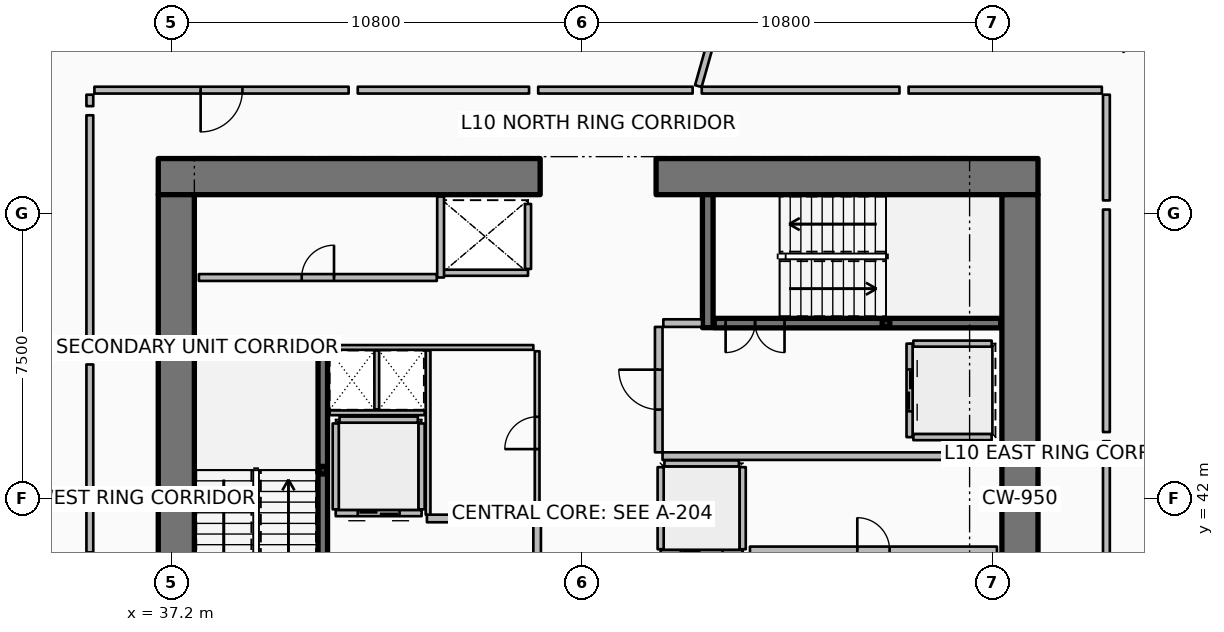
"""IFC4 building model, lengths in metres.
Left out: names, types, materials, properties, quantities, classifications, styles, units other than length and angle.
Written with IfcOpenShell. Run it as: python <this file> out.ifc"""

import sys

from ifc_helpers import new_model, si_unit, direction, frame, frame_2d, origin, origin_2d, place, context, subcontext, project, spatial, rectangle, hollow_rectangle, extrude, element, fill, save


model = new_model("IFC4")
c1 = context("Model", 3, precision=1e-05, world=origin(), true_north=direction((0.0, 1.0)))
c2 = subcontext(c1, "Body", "Model", "MODEL_VIEW")
j1 = project(units=[si_unit("LENGTHUNIT", "METRE"), si_unit("PLANEANGLEUNIT", "RADIAN")], contexts=[c1])
p1 = place(None, origin())
s1 = spatial("IfcSite", under=j1, at=p1, CompositionType="ELEMENT")
p2 = place(p1, origin())
s2 = spatial("IfcBuilding", under=s1, at=p2, CompositionType="ELEMENT")
p3 = place(p2, frame((0.0, 0.0, 45.15)))
s3 = spatial("IfcBuildingStorey", under=s2, at=p3, CompositionType="ELEMENT", Elevation=45.15)
p4 = place(p3, frame((36.85, 50.475, 0.0), z_axis=(0.0, 0.0, 1.0), x_axis=(1.0, 0.0, 0.0)))
e1 = element("IfcWall", 1, at=p4, inside=s3, PredefinedType="SHEAR", context=c2, shape_type="SweptSolid", body=[
    extrude(rectangle(XDim=10.05, YDim=0.95, at=frame_2d((5.025, 0.0))), origin(), (0.0, 0.0, 1.0), 3.75),
])
p5 = place(p3, frame((49.95, 50.475, 0.0), z_axis=(0.0, 0.0, 1.0), x_axis=(1.0, 0.0, 0.0)))
e2 = element("IfcWall", 2, at=p5, inside=s3, PredefinedType="SHEAR", context=c2, shape_type="SweptSolid", body=[
    extrude(rectangle(XDim=10.05, YDim=0.95, at=frame_2d((5.025, 0.0))), origin(), (0.0, 0.0, 1.0), 3.75),
])
for number, where, z_axis, x_axis in (
    (3, (37.325, 34.0, 0.0), (0.0, 0.0, 1.0), (0.0, 1.0, 0.0)),
    (4, (59.525, 34.0, 0.0), (0.0, 0.0, 1.0), (0.0, 1.0, 0.0)),
):
    element("IfcWall", number, at=place(p3, frame(where, z_axis=z_axis, x_axis=x_axis)), inside=s3, PredefinedType="SHEAR", context=c2, shape_type="SweptSolid", body=[
        extrude(rectangle(XDim=16.0, YDim=0.95, at=frame_2d((8.0, 0.0))), origin(), (0.0, 0.0, 1.0), 3.75),
    ])
for number, where, z_axis, x_axis in (
    (5, (37.8, 45.94, 0.0), (0.0, 0.0, 1.0), (1.0, 0.0, 0.0)),
    (6, (51.31, 46.5, 0.0), (0.0, 0.0, 1.0), (0.0, 1.0, 0.0)),
):
    element("IfcWall", number, at=place(p3, frame(where, z_axis=z_axis, x_axis=x_axis)), inside=s3, PredefinedType="SHEAR", context=c2, shape_type="SweptSolid", body=[
        extrude(rectangle(XDim=3.5, YDim=0.28, at=frame_2d((1.75, 0.0))), origin(), (0.0, 0.0, 1.0), 3.75),
    ])
for number, where, z_axis, x_axis in (
    (7, (41.18, 42.75, 0.0), (0.0, 0.0, 1.0), (1.0, 0.0, 0.0)),
    (8, (56.0, 46.62, 0.0), (0.0, 0.0, 1.0), (1.0, 0.0, 0.0)),
):
    element("IfcColumn", number, at=place(p3, frame(where, z_axis=z_axis, x_axis=x_axis)), inside=s3, PredefinedType="COLUMN", context=c2, shape_type="SweptSolid", body=[
        extrude(hollow_rectangle(XDim=0.2, YDim=0.2, WallThickness=0.01, InnerFilletRadius=0.01, OuterFilletRadius=0.02, at=origin_2d()), origin(), (0.0, 0.0, 1.0), 1.67),
    ])
p6 = place(p3, frame((41.18, 38.22, 0.0), z_axis=(0.0, 0.0, 1.0), x_axis=(0.0, 1.0, 0.0)))
e9 = element("IfcWall", 9, at=p6, inside=s3, PredefinedType="SOLIDWALL", context=c2, shape_type="SweptSolid", body=[
    extrude(rectangle(XDim=7.56, YDim=0.25, at=frame_2d((3.78, 0.0))), origin(), (0.0, 0.0, 1.0), 3.5),
])
p7 = place(p6, frame((0.3, 0.0, 0.0)))
e10 = element("IfcOpeningElement", 10, at=p7, cuts=e9, PredefinedType="OPENING", context=c2, shape_type="SweptSolid", body=[
    extrude(rectangle(XDim=1.55, YDim=2.15, at=frame_2d((0.775, 1.075))), frame((0.0, 0.135, 0.0), z_axis=(0.0, -1.0, 0.0), x_axis=(1.0, 0.0, 0.0)), (0.0, 0.0, 1.0), 0.27),
])
p8 = place(p3, frame((51.48, 46.62, 0.0), z_axis=(0.0, 0.0, 1.0), x_axis=(1.0, 0.0, 0.0)))
e11 = element("IfcWall", 11, at=p8, inside=s3, PredefinedType="SOLIDWALL", context=c2, shape_type="SweptSolid", body=[
    extrude(rectangle(XDim=7.54, YDim=0.25, at=frame_2d((3.77, 0.0))), origin(), (0.0, 0.0, 1.0), 3.5),
])
p9 = place(p8, frame((0.3, 0.0, 0.0)))
e12 = element("IfcOpeningElement", 12, at=p9, cuts=e11, PredefinedType="OPENING", context=c2, shape_type="SweptSolid", body=[
    extrude(rectangle(XDim=1.55, YDim=2.15, at=frame_2d((0.775, 1.075))), frame((0.0, 0.135, 0.0), z_axis=(0.0, -1.0, 0.0), x_axis=(1.0, 0.0, 0.0)), (0.0, 0.0, 1.0), 0.27),
])
p10 = place(p3, frame((46.58, 47.945, 0.0), z_axis=(0.0, 0.0, 1.0), x_axis=(-1.0, 0.0, 0.0)))
e13 = element("IfcWall", 13, at=p10, inside=s3, PredefinedType="PARTITIONING", context=c2, shape_type="SweptSolid", body=[
    extrude(rectangle(XDim=2.26, YDim=0.16, at=frame_2d((1.13, 0.0))), origin(), (0.0, 0.0, 1.0), 3.5),
])
p11 = place(p3, frame((46.58, 48.045, 0.0), z_axis=(0.0, 0.0, 1.0), x_axis=(0.0, 1.0, 0.0)))
e14 = element("IfcWall", 14, at=p11, inside=s3, PredefinedType="PARTITIONING", context=c2, shape_type="SweptSolid", body=[
    extrude(rectangle(XDim=1.71, YDim=0.16, at=frame_2d((0.855, 0.0))), origin(), (0.0, 0.0, 1.0), 3.5),
])
p12 = place(p3, frame((43.78, 41.62, 0.0), z_axis=(0.0, 0.0, 1.0), x_axis=(-1.0, 0.0, 0.0)))
e15 = element("IfcWall", 15, at=p12, inside=s3, PredefinedType="PARTITIONING", context=c2, shape_type="SweptSolid", body=[
    extrude(rectangle(XDim=2.26, YDim=0.16, at=frame_2d((1.13, 0.0))), origin(), (0.0, 0.0, 1.0), 3.5),
])
p13 = place(p12, frame((0.58, 0.0, 0.0)))
e16 = element("IfcOpeningElement", 16, at=p13, cuts=e15, PredefinedType="OPENING", context=c2, shape_type="SweptSolid", body=[
    extrude(rectangle(XDim=1.1, YDim=2.1, at=frame_2d((0.55, 1.05))), frame((0.0, 0.09, 0.0), z_axis=(0.0, -1.0, 0.0), x_axis=(1.0, 0.0, 0.0)), (0.0, 0.0, 1.0), 0.18),
])
for number, where, z_axis, x_axis in (
    (17, (43.78, 41.72, 0.0), (0.0, 0.0, 1.0), (0.0, 1.0, 0.0)),
    (18, (41.52, 41.72, 0.0), (0.0, 0.0, 1.0), (0.0, 1.0, 0.0)),
):
    element("IfcWall", number, at=place(p3, frame(where, z_axis=z_axis, x_axis=x_axis)), inside=s3, PredefinedType="PARTITIONING", context=c2, shape_type="SweptSolid", body=[
        extrude(rectangle(XDim=2.26, YDim=0.16, at=frame_2d((1.13, 0.0))), origin(), (0.0, 0.0, 1.0), 3.5),
    ])
p14 = place(p3, frame((41.62, 44.08, 0.0), z_axis=(0.0, 0.0, 1.0), x_axis=(1.0, 0.0, 0.0)))
e19 = element("IfcWall", 19, at=p14, inside=s3, PredefinedType="PARTITIONING", context=c2, shape_type="SweptSolid", body=[
    extrude(rectangle(XDim=2.06, YDim=0.16, at=frame_2d((1.03, 0.0))), origin(), (0.0, 0.0, 1.0), 3.5),
])
p15 = place(p3, frame((56.62, 46.08, 0.0), z_axis=(0.0, 0.0, 1.0), x_axis=(0.0, -1.0, 0.0)))
e20 = element("IfcWall", 20, at=p15, inside=s3, PredefinedType="PARTITIONING", context=c2, shape_type="SweptSolid", body=[
    extrude(rectangle(XDim=2.46, YDim=0.16, at=frame_2d((1.23, 0.0))), origin(), (0.0, 0.0, 1.0), 3.5),
])
p16 = place(p15, frame((0.68, 0.0, 0.0)))
e21 = element("IfcOpeningElement", 21, at=p16, cuts=e20, PredefinedType="OPENING", context=c2, shape_type="SweptSolid", body=[
    extrude(rectangle(XDim=1.1, YDim=2.1, at=frame_2d((0.55, 1.05))), frame((0.0, 0.09, 0.0), z_axis=(0.0, -1.0, 0.0), x_axis=(1.0, 0.0, 0.0)), (0.0, 0.0, 1.0), 0.18),
])
for number, where, z_axis, x_axis in (
    (22, (56.72, 46.08, 0.0), (0.0, 0.0, 1.0), (1.0, 0.0, 0.0)),
    (23, (56.72, 43.62, 0.0), (0.0, 0.0, 1.0), (1.0, 0.0, 0.0)),
):
    element("IfcWall", number, at=place(p3, frame(where, z_axis=z_axis, x_axis=x_axis)), inside=s3, PredefinedType="PARTITIONING", context=c2, shape_type="SweptSolid", body=[
        extrude(rectangle(XDim=2.06, YDim=0.16, at=frame_2d((1.03, 0.0))), origin(), (0.0, 0.0, 1.0), 3.5),
    ])
p17 = place(p3, frame((52.23, 40.57, 0.0), z_axis=(0.0, 0.0, 1.0), x_axis=(-1.0, 0.0, 0.0)))
e24 = element("IfcWall", 24, at=p17, inside=s3, PredefinedType="PARTITIONING", context=c2, shape_type="SweptSolid", body=[
    extrude(rectangle(XDim=2.16, YDim=0.16, at=frame_2d((1.08, 0.0))), origin(), (0.0, 0.0, 1.0), 3.5),
])
p18 = place(p17, frame((0.53, 0.0, 0.0)))
e25 = element("IfcOpeningElement", 25, at=p18, cuts=e24, PredefinedType="OPENING", context=c2, shape_type="SweptSolid", body=[
    extrude(rectangle(XDim=1.1, YDim=2.1, at=frame_2d((0.55, 1.05))), frame((0.0, 0.09, 0.0), z_axis=(0.0, -1.0, 0.0), x_axis=(1.0, 0.0, 0.0)), (0.0, 0.0, 1.0), 0.18),
])
for number, where, z_axis, x_axis in (
    (26, (52.23, 40.67, 0.0), (0.0, 0.0, 1.0), (0.0, 1.0, 0.0)),
    (27, (50.07, 40.67, 0.0), (0.0, 0.0, 1.0), (0.0, 1.0, 0.0)),
):
    element("IfcWall", number, at=place(p3, frame(where, z_axis=z_axis, x_axis=x_axis)), inside=s3, PredefinedType="PARTITIONING", context=c2, shape_type="SweptSolid", body=[
        extrude(rectangle(XDim=2.16, YDim=0.16, at=frame_2d((1.08, 0.0))), origin(), (0.0, 0.0, 1.0), 3.5),
    ])
p19 = place(p3, frame((50.17, 42.93, 0.0), z_axis=(0.0, 0.0, 1.0), x_axis=(1.0, 0.0, 0.0)))
e28 = element("IfcWall", 28, at=p19, inside=s3, PredefinedType="PARTITIONING", context=c2, shape_type="SweptSolid", body=[
    extrude(rectangle(XDim=1.96, YDim=0.16, at=frame_2d((0.98, 0.0))), origin(), (0.0, 0.0, 1.0), 3.5),
])
p20 = place(p3, frame((37.92, 47.82, 0.0), z_axis=(0.0, 0.0, 1.0), x_axis=(1.0, 0.0, 0.0)))
e29 = element("IfcWall", 29, at=p20, inside=s3, PredefinedType="PARTITIONING", context=c2, shape_type="SweptSolid", body=[
    extrude(rectangle(XDim=6.26, YDim=0.18, at=frame_2d((3.13, 0.0))), origin(), (0.0, 0.0, 1.0), 3.5),
])
p21 = place(p20, frame((2.705, 0.0, 0.0)))
e30 = element("IfcOpeningElement", 30, at=p21, cuts=e29, PredefinedType="OPENING", context=c2, shape_type="SweptSolid", body=[
    extrude(rectangle(XDim=0.85, YDim=2.06, at=frame_2d((0.425, 1.03))), frame((0.0, 0.1, 0.0), z_axis=(0.0, -1.0, 0.0), x_axis=(1.0, 0.0, 0.0)), (0.0, 0.0, 1.0), 0.2),
])
p22 = place(p3, frame((44.28, 47.82, 0.0), z_axis=(0.0, 0.0, 1.0), x_axis=(0.0, 1.0, 0.0)))
e31 = element("IfcWall", 31, at=p22, inside=s3, PredefinedType="PARTITIONING", context=c2, shape_type="SweptSolid", body=[
    extrude(rectangle(XDim=2.13, YDim=0.18, at=frame_2d((1.065, 0.0))), origin(), (0.0, 0.0, 1.0), 3.5),
])
p23 = place(p3, frame((52.42, 40.65, 0.0), z_axis=(0.0, 0.0, 1.0), x_axis=(1.0, 0.0, 0.0)))
e32 = element("IfcWall", 32, at=p23, inside=s3, PredefinedType="PARTITIONING", context=c2, shape_type="SweptSolid", body=[
    extrude(rectangle(XDim=6.5, YDim=0.18, at=frame_2d((3.25, 0.0))), origin(), (0.0, 0.0, 1.0), 3.5),
])
p24 = place(p23, frame((2.825, 0.0, 0.0)))
e33 = element("IfcOpeningElement", 33, at=p24, cuts=e32, PredefinedType="OPENING", context=c2, shape_type="SweptSolid", body=[
    extrude(rectangle(XDim=0.85, YDim=2.06, at=frame_2d((0.425, 1.03))), frame((0.0, 0.1, 0.0), z_axis=(0.0, -1.0, 0.0), x_axis=(1.0, 0.0, 0.0)), (0.0, 0.0, 1.0), 0.2),
])
p25 = place(p3, frame((43.92, 41.48, 0.0), z_axis=(0.0, 0.0, 1.0), x_axis=(1.0, 0.0, 0.0)))
e34 = element("IfcWall", 34, at=p25, inside=s3, PredefinedType="PARTITIONING", context=c2, shape_type="SweptSolid", body=[
    extrude(rectangle(XDim=2.8, YDim=0.2, at=frame_2d((1.4, 0.0))), origin(), (0.0, 0.0, 1.0), 3.5),
])
p26 = place(p3, frame((46.82, 38.12, 0.0), z_axis=(0.0, 0.0, 1.0), x_axis=(0.0, 1.0, 0.0)))
e35 = element("IfcWall", 35, at=p26, inside=s3, PredefinedType="PARTITIONING", context=c2, shape_type="SweptSolid", body=[
    extrude(rectangle(XDim=3.26, YDim=0.2, at=frame_2d((1.63, 0.0))), origin(), (0.0, 0.0, 1.0), 3.5),
])
p27 = place(p26, frame((1.105, 0.0, 0.0)))
e36 = element("IfcOpeningElement", 36, at=p27, cuts=e35, PredefinedType="OPENING", context=c2, shape_type="SweptSolid", body=[
    extrude(rectangle(XDim=1.05, YDim=2.1, at=frame_2d((0.525, 1.05))), frame((0.0, 0.11, 0.0), z_axis=(0.0, -1.0, 0.0), x_axis=(1.0, 0.0, 0.0)), (0.0, 0.0, 1.0), 0.22),
])
p28 = place(p3, frame((50.12, 43.12, 0.0), z_axis=(0.0, 0.0, 1.0), x_axis=(1.0, 0.0, 0.0)))
e37 = element("IfcWall", 37, at=p28, inside=s3, PredefinedType="PARTITIONING", context=c2, shape_type="SweptSolid", body=[
    extrude(rectangle(XDim=8.88, YDim=0.2, at=frame_2d((4.44, 0.0))), origin(), (0.0, 0.0, 1.0), 3.5),
])
p29 = place(p3, frame((50.14, 46.62, 0.0), z_axis=(0.0, 0.0, 1.0), x_axis=(1.0, 0.0, 0.0)))
e38 = element("IfcWall", 38, at=p29, inside=s3, PredefinedType="PARTITIONING", context=c2, shape_type="SweptSolid", body=[
    extrude(rectangle(XDim=1.02, YDim=0.2, at=frame_2d((0.51, 0.0))), origin(), (0.0, 0.0, 1.0), 3.5),
])
p30 = place(p3, frame((50.02, 43.22, 0.0), z_axis=(0.0, 0.0, 1.0), x_axis=(0.0, 1.0, 0.0)))
e39 = element("IfcWall", 39, at=p30, inside=s3, PredefinedType="PARTITIONING", context=c2, shape_type="SweptSolid", body=[
    extrude(rectangle(XDim=3.3, YDim=0.2, at=frame_2d((1.65, 0.0))), origin(), (0.0, 0.0, 1.0), 3.5),
])
p31 = place(p30, frame((1.125, 0.0, 0.0)))
e40 = element("IfcOpeningElement", 40, at=p31, cuts=e39, PredefinedType="OPENING", context=c2, shape_type="SweptSolid", body=[
    extrude(rectangle(XDim=1.05, YDim=2.1, at=frame_2d((0.525, 1.05))), frame((0.0, 0.11, 0.0), z_axis=(0.0, -1.0, 0.0), x_axis=(1.0, 0.0, 0.0)), (0.0, 0.0, 1.0), 0.22),
])
p32 = place(p3, frame((41.36, 45.98, 0.0), z_axis=(0.0, 0.0, 1.0), x_axis=(1.0, 0.0, 0.0)))
e41 = element("IfcWall", 41, at=p32, inside=s3, PredefinedType="PARTITIONING", context=c2, shape_type="SweptSolid", body=[
    extrude(rectangle(XDim=5.36, YDim=0.125, at=frame_2d((2.68, 0.0))), origin(), (0.0, 0.0, 1.0), 2.94),
])
p33 = place(p3, frame((41.36, 44.26, 0.0), z_axis=(0.0, 0.0, 1.0), x_axis=(1.0, 0.0, 0.0)))
e42 = element("IfcWall", 42, at=p33, inside=s3, PredefinedType="PARTITIONING", context=c2, shape_type="SweptSolid", body=[
    extrude(rectangle(XDim=2.5, YDim=0.125, at=frame_2d((1.25, 0.0))), origin(), (0.0, 0.0, 1.0), 2.94),
])
p34 = place(p3, frame((42.6, 44.35, 0.0), z_axis=(0.0, 0.0, 1.0), x_axis=(0.0, 1.0, 0.0)))
e43 = element("IfcWall", 43, at=p34, inside=s3, PredefinedType="PARTITIONING", context=c2, shape_type="SweptSolid", body=[
    extrude(rectangle(XDim=1.55, YDim=0.125, at=frame_2d((0.775, 0.0))), origin(), (0.0, 0.0, 1.0), 2.94),
])
p35 = place(p3, frame((43.95, 41.58, 0.0), z_axis=(0.0, 0.0, 1.0), x_axis=(0.0, 1.0, 0.0)))
e44 = element("IfcWall", 44, at=p35, inside=s3, PredefinedType="PARTITIONING", context=c2, shape_type="SweptSolid", body=[
    extrude(rectangle(XDim=4.32, YDim=0.125, at=frame_2d((2.16, 0.0))), origin(), (0.0, 0.0, 1.0), 2.94),
])
p36 = place(p3, frame((46.82, 41.58, 0.0), z_axis=(0.0, 0.0, 1.0), x_axis=(0.0, 1.0, 0.0)))
e45 = element("IfcWall", 45, at=p36, inside=s3, PredefinedType="PARTITIONING", context=c2, shape_type="SweptSolid", body=[
    extrude(rectangle(XDim=4.3, YDim=0.125, at=frame_2d((2.15, 0.0))), origin(), (0.0, 0.0, 1.0), 2.94),
])
p37 = place(p36, frame((1.725, 0.0, 0.0)))
e46 = element("IfcOpeningElement", 46, at=p37, cuts=e45, PredefinedType="OPENING", context=c2, shape_type="SweptSolid", body=[
    extrude(rectangle(XDim=0.85, YDim=2.06, at=frame_2d((0.425, 1.03))), frame((0.0, 0.073, 0.0), z_axis=(0.0, -1.0, 0.0), x_axis=(1.0, 0.0, 0.0)), (0.0, 0.0, 1.0), 0.145),
])
p38 = place(p3, frame((51.062, 52.856, 0.0), z_axis=(0.0, 0.0, 1.0), x_axis=(0.27143758514, 0.962456044385, 0.0)))
e47 = element("IfcWall", 47, at=p38, inside=s3, PredefinedType="PARTITIONING", context=c2, shape_type="SweptSolid", body=[
    extrude(rectangle(XDim=16.693, YDim=0.18, at=frame_2d((8.346, 0.0))), origin(), (0.0, 0.0, 1.0), 2.867),
])
p39 = place(p3, frame((41.86, 52.75, 0.0), z_axis=(0.0, 0.0, 1.0), x_axis=(-1.0, 0.0, 0.0)))
e48 = element("IfcWall", 48, at=p39, inside=s3, PredefinedType="PARTITIONING", context=c2, shape_type="SweptSolid", body=[
    extrude(rectangle(XDim=6.69, YDim=0.18, at=frame_2d((3.345, 0.0))), origin(), (0.0, 0.0, 1.0), 2.867),
])
p40 = place(p39, frame((2.795, 0.0, 0.0)))
e49 = element("IfcOpeningElement", 49, at=p40, cuts=e48, PredefinedType="OPENING", context=c2, shape_type="SweptSolid", body=[
    extrude(rectangle(XDim=1.1, YDim=2.1, at=frame_2d((0.55, 1.05))), frame((0.0, 0.1, 0.0), z_axis=(0.0, -1.0, 0.0), x_axis=(1.0, 0.0, 0.0)), (0.0, 0.0, 1.0), 0.2),
])
p41 = place(p3, frame((35.05, 52.63, 0.0), z_axis=(0.0, 0.0, 1.0), x_axis=(0.0, -1.0, 0.0)))
e50 = element("IfcWall", 50, at=p41, inside=s3, PredefinedType="PARTITIONING", context=c2, shape_type="SweptSolid", body=[
    extrude(rectangle(XDim=0.301, YDim=0.18, at=frame_2d((0.15, 0.0))), origin(), (0.0, 0.0, 1.0), 2.867),
])
p42 = place(p3, frame((50.912, 52.75, 0.0), z_axis=(0.0, 0.0, 1.0), x_axis=(-1.0, 0.0, 0.0)))
e51 = element("IfcWall", 51, at=p42, inside=s3, PredefinedType="PARTITIONING", context=c2, shape_type="SweptSolid", body=[
    extrude(rectangle(XDim=4.064, YDim=0.18, at=frame_2d((2.032, 0.0))), origin(), (0.0, 0.0, 1.0), 2.867),
])
p43 = place(p3, frame((46.608, 52.75, 0.0), z_axis=(0.0, 0.0, 1.0), x_axis=(-1.0, 0.0, 0.0)))
e52 = element("IfcWall", 52, at=p43, inside=s3, PredefinedType="PARTITIONING", context=c2, shape_type="SweptSolid", body=[
    extrude(rectangle(XDim=4.508, YDim=0.18, at=frame_2d((2.254, 0.0))), origin(), (0.0, 0.0, 1.0), 2.867),
])
p44 = place(p3, frame((35.05, 52.089, 0.0), z_axis=(0.0, 0.0, 1.0), x_axis=(0.0, -1.0, 0.0)))
e53 = element("IfcWall", 53, at=p44, inside=s3, PredefinedType="PARTITIONING", context=c2, shape_type="SweptSolid", body=[
    extrude(rectangle(XDim=6.317, YDim=0.18, at=frame_2d((3.158, 0.0))), origin(), (0.0, 0.0, 1.0), 2.867),
])
p45 = place(p3, frame((35.05, 45.532, 0.0), z_axis=(0.0, 0.0, 1.0), x_axis=(0.0, -1.0, 0.0)))
e54 = element("IfcWall", 54, at=p45, inside=s3, PredefinedType="PARTITIONING", context=c2, shape_type="SweptSolid", body=[
    extrude(rectangle(XDim=4.945, YDim=0.18, at=frame_2d((2.472, 0.0))), origin(), (0.0, 0.0, 1.0), 2.867),
])
p46 = place(p3, frame((61.8, 38.228, 0.0), z_axis=(0.0, 0.0, 1.0), x_axis=(0.0, 1.0, 0.0)))
e55 = element("IfcWall", 55, at=p46, inside=s3, PredefinedType="PARTITIONING", context=c2, shape_type="SweptSolid", body=[
    extrude(rectangle(XDim=5.285, YDim=0.18, at=frame_2d((2.643, 0.0))), origin(), (0.0, 0.0, 1.0), 2.867),
])
p47 = place(p3, frame((61.8, 43.753, 0.0), z_axis=(0.0, 0.0, 1.0), x_axis=(0.0, 1.0, 0.0)))
e56 = element("IfcWall", 56, at=p47, inside=s3, PredefinedType="PARTITIONING", context=c2, shape_type="SweptSolid", body=[
    extrude(rectangle(XDim=5.855, YDim=0.18, at=frame_2d((2.927, 0.0))), origin(), (0.0, 0.0, 1.0), 2.867),
])
p48 = place(p3, frame((61.8, 49.848, 0.0), z_axis=(0.0, 0.0, 1.0), x_axis=(0.0, 1.0, 0.0)))
e57 = element("IfcWall", 57, at=p48, inside=s3, PredefinedType="PARTITIONING", context=c2, shape_type="SweptSolid", body=[
    extrude(rectangle(XDim=2.781, YDim=0.18, at=frame_2d((1.391, 0.0))), origin(), (0.0, 0.0, 1.0), 2.867),
])
p49 = place(p3, frame((61.68, 52.75, 0.0), z_axis=(0.0, 0.0, 1.0), x_axis=(-1.0, 0.0, 0.0)))
e58 = element("IfcWall", 58, at=p49, inside=s3, PredefinedType="PARTITIONING", context=c2, shape_type="SweptSolid", body=[
    extrude(rectangle(XDim=5.085, YDim=0.18, at=frame_2d((2.543, 0.0))), origin(), (0.0, 0.0, 1.0), 2.867),
])
p50 = place(p3, frame((56.354, 52.75, 0.0), z_axis=(0.0, 0.0, 1.0), x_axis=(-1.0, 0.0, 0.0)))
e59 = element("IfcWall", 59, at=p50, inside=s3, PredefinedType="PARTITIONING", context=c2, shape_type="SweptSolid", body=[
    extrude(rectangle(XDim=5.203, YDim=0.18, at=frame_2d((2.601, 0.0))), origin(), (0.0, 0.0, 1.0), 2.867),
])
p51 = place(p9, origin())
e60 = element("IfcDoor", 60, at=p51, inside=s3, OperationType="DOUBLE_DOOR_SINGLE_SWING", PredefinedType="DOOR", context=c2, shape_type="SweptSolid", body=[
    extrude(rectangle(XDim=1.55, YDim=2.15, at=frame_2d((0.775, 1.075))), frame((0.0, 0.025, 0.0), z_axis=(0.0, -1.0, 0.0), x_axis=(1.0, 0.0, 0.0)), (0.0, 0.0, 1.0), 0.05),
])
fill(e12, e60)
p52 = place(p13, origin())
e61 = element("IfcDoor", 61, at=p52, inside=s3, OperationType="DOUBLE_DOOR_SLIDING", PredefinedType="DOOR", context=c2, shape_type="SweptSolid", body=[
    extrude(rectangle(XDim=1.1, YDim=2.1, at=frame_2d((0.55, 1.05))), frame((0.0, 0.025, 0.0), z_axis=(0.0, -1.0, 0.0), x_axis=(1.0, 0.0, 0.0)), (0.0, 0.0, 1.0), 0.05),
])
fill(e16, e61)
p53 = place(p16, origin())
e62 = element("IfcDoor", 62, at=p53, inside=s3, OperationType="DOUBLE_DOOR_SLIDING", PredefinedType="DOOR", context=c2, shape_type="SweptSolid", body=[
    extrude(rectangle(XDim=1.1, YDim=2.1, at=frame_2d((0.55, 1.05))), frame((0.0, 0.025, 0.0), z_axis=(0.0, -1.0, 0.0), x_axis=(1.0, 0.0, 0.0)), (0.0, 0.0, 1.0), 0.05),
])
fill(e21, e62)
p54 = place(p18, origin())
e63 = element("IfcDoor", 63, at=p54, inside=s3, OperationType="DOUBLE_DOOR_SLIDING", PredefinedType="DOOR", context=c2, shape_type="SweptSolid", body=[
    extrude(rectangle(XDim=1.1, YDim=2.1, at=frame_2d((0.55, 1.05))), frame((0.0, 0.025, 0.0), z_axis=(0.0, -1.0, 0.0), x_axis=(1.0, 0.0, 0.0)), (0.0, 0.0, 1.0), 0.05),
])
fill(e25, e63)
p55 = place(p21, origin())
e64 = element("IfcDoor", 64, at=p55, inside=s3, OperationType="SINGLE_SWING_RIGHT", PredefinedType="DOOR", context=c2, shape_type="SweptSolid", body=[
    extrude(rectangle(XDim=0.85, YDim=2.06, at=frame_2d((0.425, 1.03))), frame((0.0, 0.025, 0.0), z_axis=(0.0, -1.0, 0.0), x_axis=(1.0, 0.0, 0.0)), (0.0, 0.0, 1.0), 0.05),
])
fill(e30, e64)
p56 = place(p24, origin())
e65 = element("IfcDoor", 65, at=p56, inside=s3, OperationType="SINGLE_SWING_LEFT", PredefinedType="DOOR", context=c2, shape_type="SweptSolid", body=[
    extrude(rectangle(XDim=0.85, YDim=2.06, at=frame_2d((0.425, 1.03))), frame((0.0, 0.025, 0.0), z_axis=(0.0, -1.0, 0.0), x_axis=(1.0, 0.0, 0.0)), (0.0, 0.0, 1.0), 0.05),
])
fill(e33, e65)
p57 = place(p31, origin())
e66 = element("IfcDoor", 66, at=p57, inside=s3, OperationType="SINGLE_SWING_RIGHT", PredefinedType="DOOR", context=c2, shape_type="SweptSolid", body=[
    extrude(rectangle(XDim=1.05, YDim=2.1, at=frame_2d((0.525, 1.05))), frame((0.0, 0.025, 0.0), z_axis=(0.0, -1.0, 0.0), x_axis=(1.0, 0.0, 0.0)), (0.0, 0.0, 1.0), 0.05),
])
fill(e40, e66)
p58 = place(p37, origin())
e67 = element("IfcDoor", 67, at=p58, inside=s3, OperationType="SINGLE_SWING_LEFT", PredefinedType="DOOR", context=c2, shape_type="SweptSolid", body=[
    extrude(rectangle(XDim=0.85, YDim=2.06, at=frame_2d((0.425, 1.03))), frame((0.0, 0.025, 0.0), z_axis=(0.0, -1.0, 0.0), x_axis=(1.0, 0.0, 0.0)), (0.0, 0.0, 1.0), 0.05),
])
fill(e46, e67)
p59 = place(p40, origin())
e68 = element("IfcDoor", 68, at=p59, inside=s3, OperationType="SINGLE_SWING_RIGHT", PredefinedType="DOOR", context=c2, shape_type="SweptSolid", body=[
    extrude(rectangle(XDim=1.1, YDim=2.1, at=frame_2d((0.55, 1.05))), frame((0.0, 0.025, 0.0), z_axis=(0.0, -1.0, 0.0), x_axis=(1.0, 0.0, 0.0)), (0.0, 0.0, 1.0), 0.05),
])
fill(e49, e68)
save(model, sys.argv[1])
